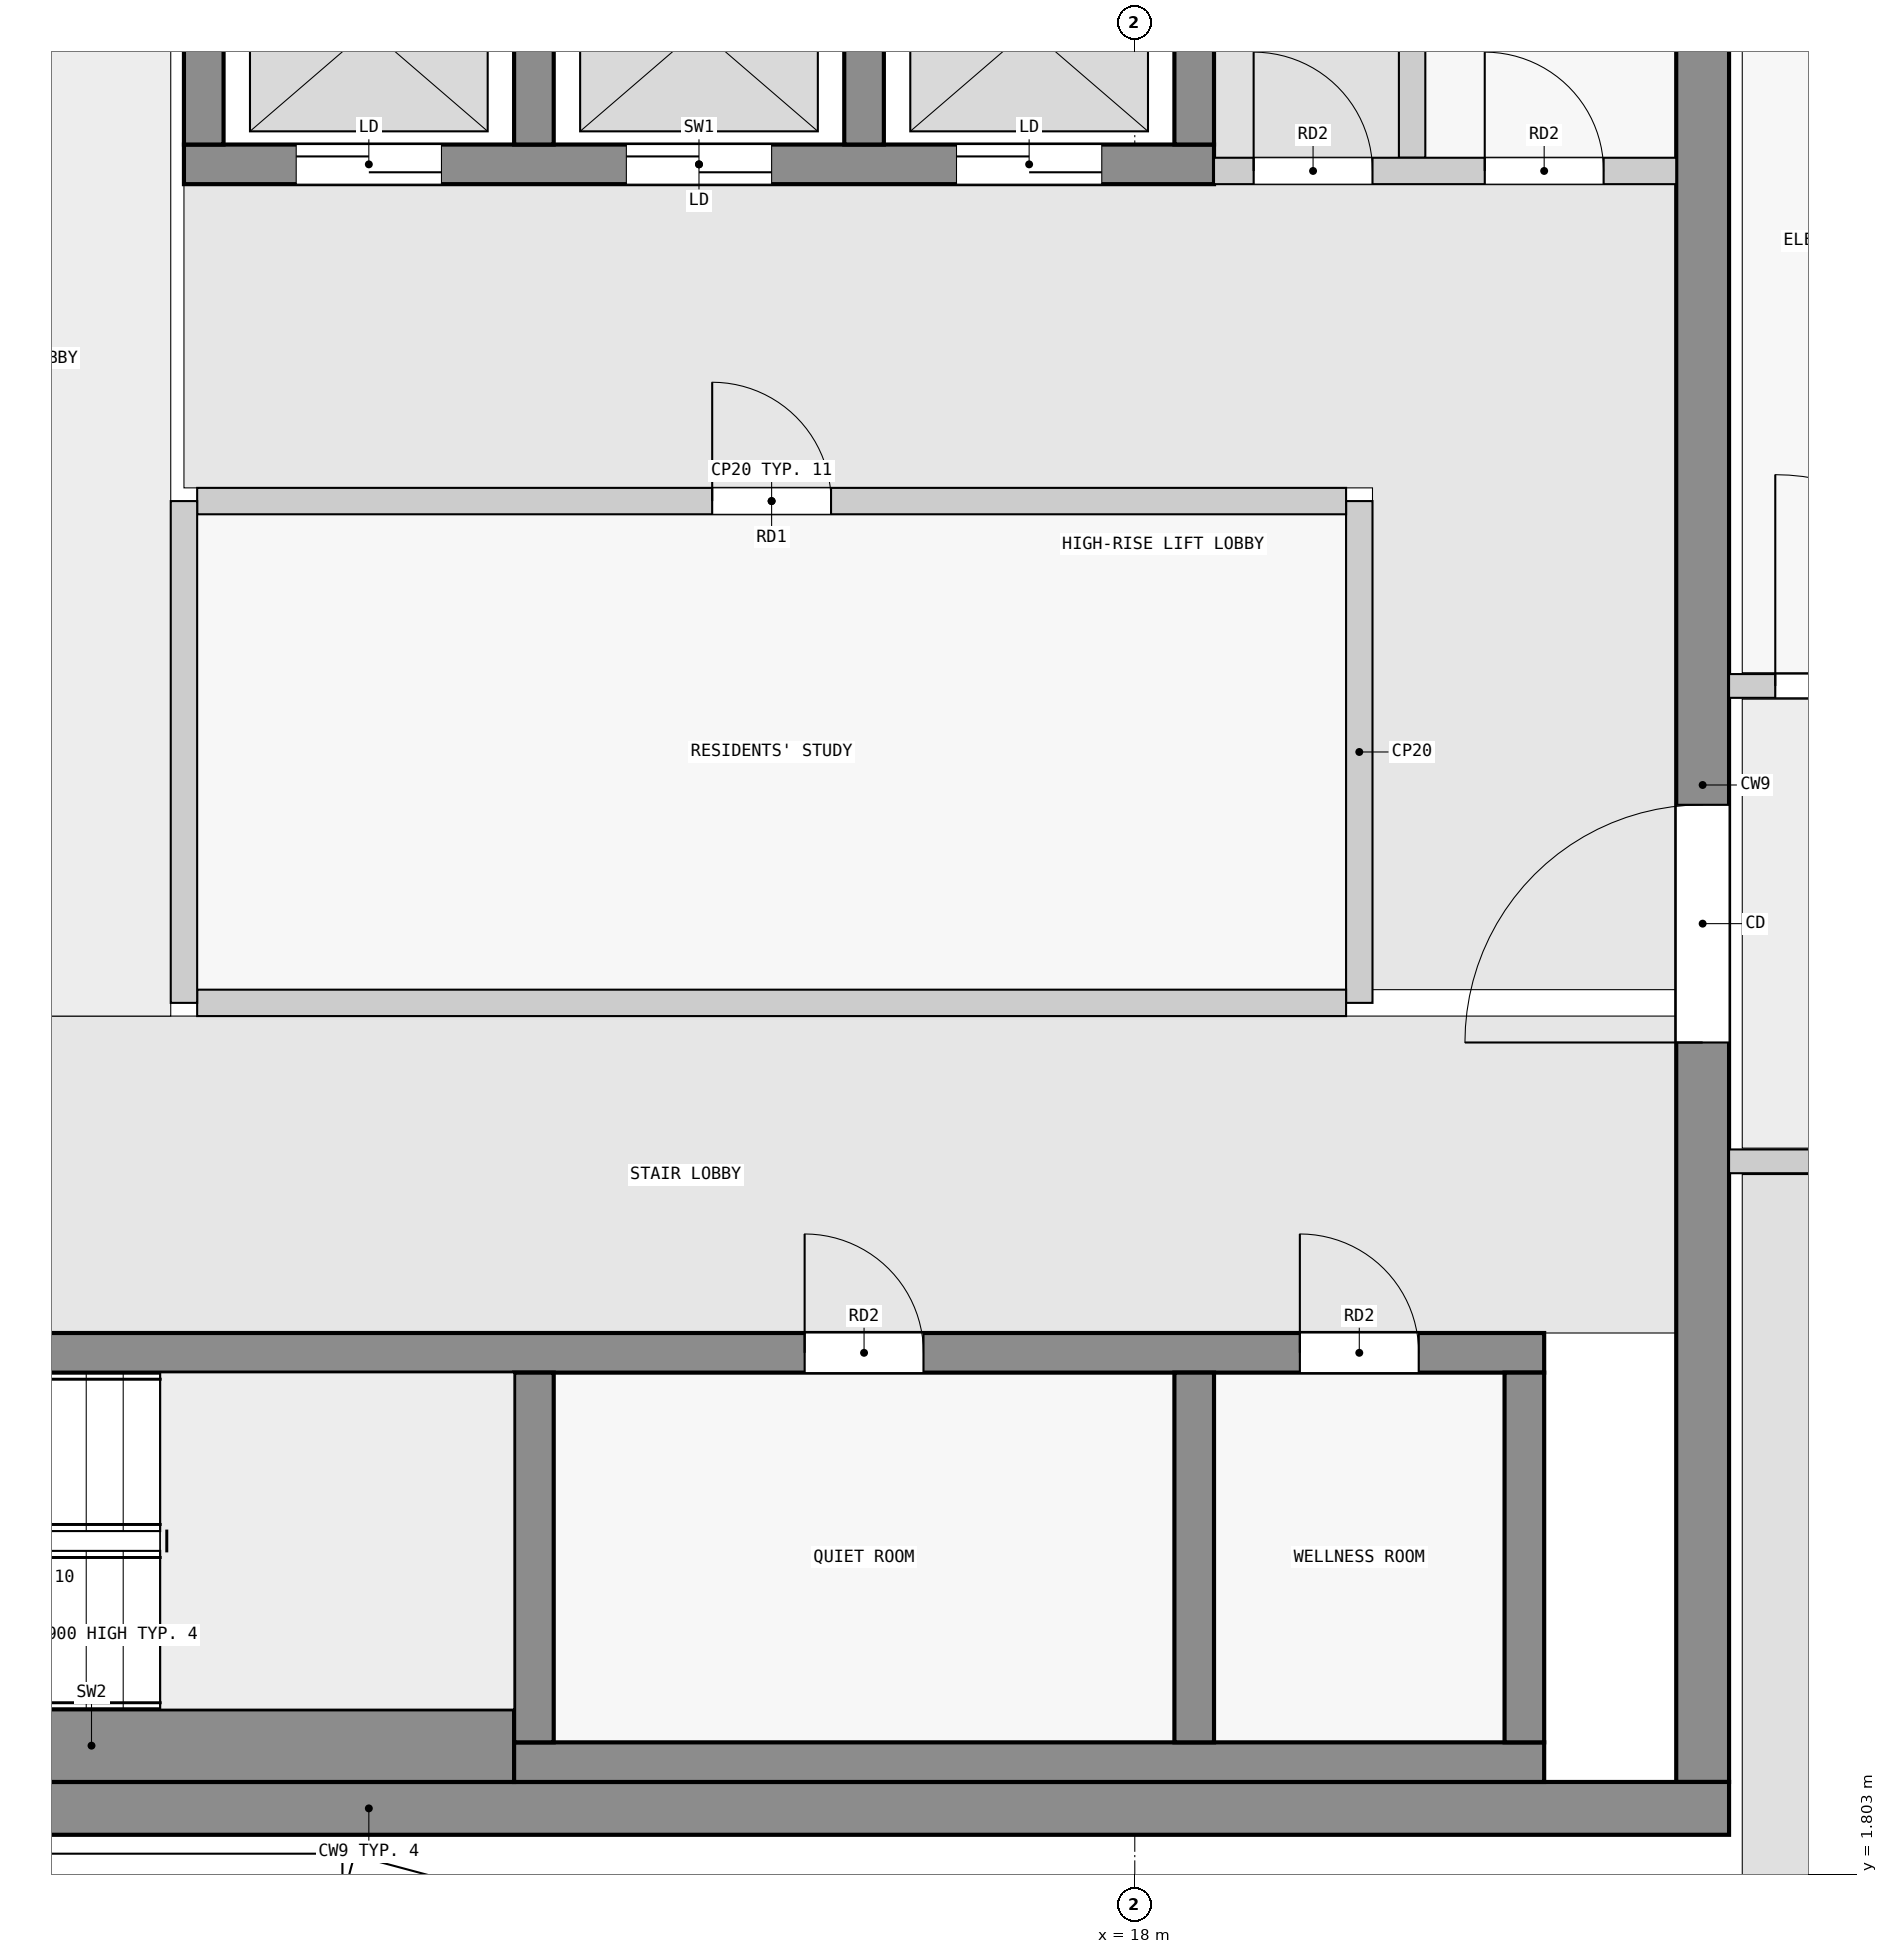
"""IFC4 building model, lengths in metres.
Left out: names, types, materials, properties, quantities, classifications, styles, units other than length and angle.
Written with IfcOpenShell. Run it as: python <this file> out.ifc"""

import sys

from ifc_helpers import new_model, si_unit, direction, frame, frame_2d, origin, place, context, subcontext, project, spatial, rectangle, extrude, element, fill, save


model = new_model("IFC4")
c1 = context("Model", 3, precision=1e-05, world=origin(), true_north=direction((0.0, 1.0)))
c2 = subcontext(c1, "Body", "Model", "MODEL_VIEW")
j1 = project(units=[si_unit("LENGTHUNIT", "METRE"), si_unit("PLANEANGLEUNIT", "RADIAN")], contexts=[c1])
p1 = place(None, origin())
s1 = spatial("IfcSite", under=j1, at=p1, CompositionType="ELEMENT")
p2 = place(p1, origin())
s2 = spatial("IfcBuilding", under=s1, at=p2, CompositionType="ELEMENT")
p3 = place(p2, frame((0.0, 0.0, 308.9)))
s3 = spatial("IfcBuildingStorey", under=s2, at=p3, CompositionType="ELEMENT", Elevation=308.9)
p4 = place(p3, frame((1.9, 2.3, 0.0), z_axis=(0.0, 0.0, 1.0), x_axis=(1.0, 0.0, 0.0)))
e1 = element("IfcWall", 1, at=p4, inside=s3, PredefinedType="SHEAR", context=c2, shape_type="SweptSolid", body=[
    extrude(rectangle(XDim=20.6, YDim=0.4, at=frame_2d((10.3, 0.0))), origin(), (0.0, 0.0, 1.0), 3.2),
])
p5 = place(p3, frame((22.3, 2.5, 0.0), z_axis=(0.0, 0.0, 1.0), x_axis=(0.0, 1.0, 0.0)))
e2 = element("IfcWall", 2, at=p5, inside=s3, PredefinedType="SHEAR", context=c2, shape_type="SweptSolid", body=[
    extrude(rectangle(XDim=15.1, YDim=0.4, at=frame_2d((7.55, 0.0))), origin(), (0.0, 0.0, 1.0), 3.2),
])
p6 = place(p5, frame((5.6, 0.0, 0.0)))
e3 = element("IfcOpeningElement", 3, at=p6, cuts=e2, PredefinedType="OPENING", context=c2, shape_type="SweptSolid", body=[
    extrude(rectangle(XDim=1.8, YDim=2.1, at=frame_2d((0.9, 1.05))), frame((0.0, 0.21, 0.0), z_axis=(0.0, -1.0, 0.0), x_axis=(1.0, 0.0, 0.0)), (0.0, 0.0, 1.0), 0.42),
])
p7 = place(p3, frame((6.9, 2.775, 0.0), z_axis=(0.0, 0.0, 1.0), x_axis=(1.0, 0.0, 0.0)))
e4 = element("IfcWall", 4, at=p7, inside=s3, PredefinedType="SHEAR", context=c2, shape_type="SweptSolid", body=[
    extrude(rectangle(XDim=6.4, YDim=0.55, at=frame_2d((3.2, 0.0))), origin(), (0.0, 0.0, 1.0), 3.2),
])
p8 = place(p3, frame((13.3, 2.65, 0.0), z_axis=(0.0, 0.0, 1.0), x_axis=(1.0, 0.0, 0.0)))
e5 = element("IfcWall", 5, at=p8, inside=s3, PredefinedType="SHEAR", context=c2, shape_type="SweptSolid", body=[
    extrude(rectangle(XDim=7.8, YDim=0.3, at=frame_2d((3.9, 0.0))), origin(), (0.0, 0.0, 1.0), 3.2),
])
for number, where, z_axis, x_axis in (
    (6, (13.45, 2.8, 0.0), (0.0, 0.0, 1.0), (0.0, 1.0, 0.0)),
    (7, (18.45, 2.8, 0.0), (0.0, 0.0, 1.0), (0.0, 1.0, 0.0)),
    (8, (20.95, 2.8, 0.0), (0.0, 0.0, 1.0), (0.0, 1.0, 0.0)),
):
    element("IfcWall", number, at=place(p3, frame(where, z_axis=z_axis, x_axis=x_axis)), inside=s3, PredefinedType="SHEAR", context=c2, shape_type="SweptSolid", body=[
        extrude(rectangle(XDim=2.8, YDim=0.3, at=frame_2d((1.4, 0.0))), origin(), (0.0, 0.0, 1.0), 3.2),
    ])
p9 = place(p3, frame((2.3, 5.75, 0.0), z_axis=(0.0, 0.0, 1.0), x_axis=(1.0, 0.0, 0.0)))
e9 = element("IfcWall", 9, at=p9, inside=s3, PredefinedType="SHEAR", context=c2, shape_type="SweptSolid", body=[
    extrude(rectangle(XDim=18.8, YDim=0.3, at=frame_2d((9.4, 0.0))), origin(), (0.0, 0.0, 1.0), 3.2),
])
p10 = place(p9, frame((4.65, 0.0, 0.0)))
e10 = element("IfcOpeningElement", 10, at=p10, cuts=e9, PredefinedType="OPENING", context=c2, shape_type="SweptSolid", body=[
    extrude(rectangle(XDim=1.1, YDim=2.1, at=frame_2d((0.55, 1.05))), frame((0.0, 0.16, 0.0), z_axis=(0.0, -1.0, 0.0), x_axis=(1.0, 0.0, 0.0)), (0.0, 0.0, 1.0), 0.32),
])
p11 = place(p9, frame((0.45, 0.0, 0.0)))
e11 = element("IfcOpeningElement", 11, at=p11, cuts=e9, PredefinedType="OPENING", context=c2, shape_type="SweptSolid", body=[
    extrude(rectangle(XDim=1.1, YDim=2.1, at=frame_2d((0.55, 1.05))), frame((0.0, 0.16, 0.0), z_axis=(0.0, -1.0, 0.0), x_axis=(1.0, 0.0, 0.0)), (0.0, 0.0, 1.0), 0.32),
])
p12 = place(p9, frame((2.75, 0.0, 0.0)))
e12 = element("IfcOpeningElement", 12, at=p12, cuts=e9, PredefinedType="OPENING", context=c2, shape_type="SweptSolid", body=[
    extrude(rectangle(XDim=1.1, YDim=2.1, at=frame_2d((0.55, 1.05))), frame((0.0, 0.16, 0.0), z_axis=(0.0, -1.0, 0.0), x_axis=(1.0, 0.0, 0.0)), (0.0, 0.0, 1.0), 0.32),
])
p13 = place(p9, frame((13.2, 0.0, 0.0)))
e13 = element("IfcOpeningElement", 13, at=p13, cuts=e9, PredefinedType="OPENING", context=c2, shape_type="SweptSolid", body=[
    extrude(rectangle(XDim=0.9, YDim=2.1, at=frame_2d((0.45, 1.05))), frame((0.0, 0.16, 0.0), z_axis=(0.0, -1.0, 0.0), x_axis=(1.0, 0.0, 0.0)), (0.0, 0.0, 1.0), 0.32),
])
p14 = place(p9, frame((16.95, 0.0, 0.0)))
e14 = element("IfcOpeningElement", 14, at=p14, cuts=e9, PredefinedType="OPENING", context=c2, shape_type="SweptSolid", body=[
    extrude(rectangle(XDim=0.9, YDim=2.1, at=frame_2d((0.45, 1.05))), frame((0.0, 0.16, 0.0), z_axis=(0.0, -1.0, 0.0), x_axis=(1.0, 0.0, 0.0)), (0.0, 0.0, 1.0), 0.32),
])
p15 = place(p3, frame((10.8, 14.75, 0.0), z_axis=(0.0, 0.0, 1.0), x_axis=(1.0, 0.0, 0.0)))
e15 = element("IfcWall", 15, at=p15, inside=s3, PredefinedType="SHEAR", context=c2, shape_type="SweptSolid", body=[
    extrude(rectangle(XDim=7.8, YDim=0.3, at=frame_2d((3.9, 0.0))), origin(), (0.0, 0.0, 1.0), 3.2),
])
p16 = place(p15, frame((0.85, 0.0, 0.0)))
e16 = element("IfcOpeningElement", 16, at=p16, cuts=e15, PredefinedType="OPENING", context=c2, shape_type="SweptSolid", body=[
    extrude(rectangle(XDim=1.1, YDim=2.1, at=frame_2d((0.55, 1.05))), frame((0.0, 0.16, 0.0), z_axis=(0.0, -1.0, 0.0), x_axis=(1.0, 0.0, 0.0)), (0.0, 0.0, 1.0), 0.32),
])
p17 = place(p15, frame((3.35, 0.0, 0.0)))
e17 = element("IfcOpeningElement", 17, at=p17, cuts=e15, PredefinedType="OPENING", context=c2, shape_type="SweptSolid", body=[
    extrude(rectangle(XDim=1.1, YDim=2.1, at=frame_2d((0.55, 1.05))), frame((0.0, 0.16, 0.0), z_axis=(0.0, -1.0, 0.0), x_axis=(1.0, 0.0, 0.0)), (0.0, 0.0, 1.0), 0.32),
])
p18 = place(p15, frame((5.85, 0.0, 0.0)))
e18 = element("IfcOpeningElement", 18, at=p18, cuts=e15, PredefinedType="OPENING", context=c2, shape_type="SweptSolid", body=[
    extrude(rectangle(XDim=1.1, YDim=2.1, at=frame_2d((0.55, 1.05))), frame((0.0, 0.16, 0.0), z_axis=(0.0, -1.0, 0.0), x_axis=(1.0, 0.0, 0.0)), (0.0, 0.0, 1.0), 0.32),
])
for number, where, z_axis, x_axis in (
    (19, (10.95, 14.9, 0.0), (0.0, 0.0, 1.0), (0.0, 1.0, 0.0)),
    (20, (13.45, 14.9, 0.0), (0.0, 0.0, 1.0), (0.0, 1.0, 0.0)),
    (21, (15.95, 14.9, 0.0), (0.0, 0.0, 1.0), (0.0, 1.0, 0.0)),
    (22, (18.45, 14.9, 0.0), (0.0, 0.0, 1.0), (0.0, 1.0, 0.0)),
):
    element("IfcWall", number, at=place(p3, frame(where, z_axis=z_axis, x_axis=x_axis)), inside=s3, PredefinedType="SHEAR", context=c2, shape_type="SweptSolid", body=[
        extrude(rectangle(XDim=2.0, YDim=0.3, at=frame_2d((1.0, 0.0))), origin(), (0.0, 0.0, 1.0), 3.2),
    ])
p19 = place(p3, frame((10.8, 8.4, 0.0), z_axis=(0.0, 0.0, 1.0), x_axis=(0.0, 1.0, 0.0)))
e23 = element("IfcWall", 23, at=p19, inside=s3, PredefinedType="PARTITIONING", context=c2, shape_type="SweptSolid", body=[
    extrude(rectangle(XDim=3.8, YDim=0.2, at=frame_2d((1.9, 0.0))), origin(), (0.0, 0.0, 1.0), 3.2),
])
p20 = place(p3, frame((10.9, 8.4, 0.0), z_axis=(0.0, 0.0, 1.0), x_axis=(1.0, 0.0, 0.0)))
e24 = element("IfcWall", 24, at=p20, inside=s3, PredefinedType="PARTITIONING", context=c2, shape_type="SweptSolid", body=[
    extrude(rectangle(XDim=8.7, YDim=0.2, at=frame_2d((4.35, 0.0))), origin(), (0.0, 0.0, 1.0), 3.2),
])
p21 = place(p3, frame((19.7, 8.4, 0.0), z_axis=(0.0, 0.0, 1.0), x_axis=(0.0, 1.0, 0.0)))
e25 = element("IfcWall", 25, at=p21, inside=s3, PredefinedType="PARTITIONING", context=c2, shape_type="SweptSolid", body=[
    extrude(rectangle(XDim=3.8, YDim=0.2, at=frame_2d((1.9, 0.0))), origin(), (0.0, 0.0, 1.0), 3.2),
])
p22 = place(p3, frame((10.9, 12.2, 0.0), z_axis=(0.0, 0.0, 1.0), x_axis=(1.0, 0.0, 0.0)))
e26 = element("IfcWall", 26, at=p22, inside=s3, PredefinedType="PARTITIONING", context=c2, shape_type="SweptSolid", body=[
    extrude(rectangle(XDim=8.7, YDim=0.2, at=frame_2d((4.35, 0.0))), origin(), (0.0, 0.0, 1.0), 3.2),
])
p23 = place(p22, frame((3.9, 0.0, 0.0)))
e27 = element("IfcOpeningElement", 27, at=p23, cuts=e26, PredefinedType="OPENING", context=c2, shape_type="SweptSolid", body=[
    extrude(rectangle(XDim=0.9, YDim=2.1, at=frame_2d((0.45, 1.05))), frame((0.0, 0.11, 0.0), z_axis=(0.0, -1.0, 0.0), x_axis=(1.0, 0.0, 0.0)), (0.0, 0.0, 1.0), 0.22),
])
p24 = place(p3, frame((18.6, 14.7, 0.0), z_axis=(0.0, 0.0, 1.0), x_axis=(1.0, 0.0, 0.0)))
e28 = element("IfcWall", 28, at=p24, inside=s3, PredefinedType="PARTITIONING", context=c2, shape_type="SweptSolid", body=[
    extrude(rectangle(XDim=3.5, YDim=0.2, at=frame_2d((1.75, 0.0))), origin(), (0.0, 0.0, 1.0), 3.2),
])
p25 = place(p24, frame((0.3, 0.0, 0.0)))
e29 = element("IfcOpeningElement", 29, at=p25, cuts=e28, PredefinedType="OPENING", context=c2, shape_type="SweptSolid", body=[
    extrude(rectangle(XDim=0.9, YDim=2.1, at=frame_2d((0.45, 1.05))), frame((0.0, 0.11, 0.0), z_axis=(0.0, -1.0, 0.0), x_axis=(1.0, 0.0, 0.0)), (0.0, 0.0, 1.0), 0.22),
])
p26 = place(p24, frame((2.05, 0.0, 0.0)))
e30 = element("IfcOpeningElement", 30, at=p26, cuts=e28, PredefinedType="OPENING", context=c2, shape_type="SweptSolid", body=[
    extrude(rectangle(XDim=0.9, YDim=2.1, at=frame_2d((0.45, 1.05))), frame((0.0, 0.11, 0.0), z_axis=(0.0, -1.0, 0.0), x_axis=(1.0, 0.0, 0.0)), (0.0, 0.0, 1.0), 0.22),
])
p27 = place(p3, frame((20.1, 14.8, 0.0), z_axis=(0.0, 0.0, 1.0), x_axis=(0.0, 1.0, 0.0)))
e31 = element("IfcWall", 31, at=p27, inside=s3, PredefinedType="PARTITIONING", context=c2, shape_type="SweptSolid", body=[
    extrude(rectangle(XDim=2.8, YDim=0.2, at=frame_2d((1.4, 0.0))), origin(), (0.0, 0.0, 1.0), 3.2),
])
p28 = place(p3, frame((27.0, 7.2, 0.0), z_axis=(0.0, 0.0, 1.0), x_axis=(-1.0, 0.0, 0.0)))
e32 = element("IfcWall", 32, at=p28, inside=s3, PredefinedType="PARTITIONING", context=c2, shape_type="SweptSolid", body=[
    extrude(rectangle(XDim=4.5, YDim=0.18, at=frame_2d((2.25, 0.0))), origin(), (0.0, 0.0, 1.0), 2.592),
])
p29 = place(p28, frame((1.35, 0.0, 0.0)))
e33 = element("IfcOpeningElement", 33, at=p29, cuts=e32, PredefinedType="OPENING", context=c2, shape_type="SweptSolid", body=[
    extrude(rectangle(XDim=1.6, YDim=2.4, at=frame_2d((0.8, 1.2))), frame((0.0, 0.1, 0.0), z_axis=(0.0, -1.0, 0.0), x_axis=(1.0, 0.0, 0.0)), (0.0, 0.0, 1.0), 0.2),
])
p30 = place(p3, frame((22.5, 10.8, 0.0), z_axis=(0.0, 0.0, 1.0), x_axis=(1.0, 0.0, 0.0)))
e34 = element("IfcWall", 34, at=p30, inside=s3, PredefinedType="PARTITIONING", context=c2, shape_type="SweptSolid", body=[
    extrude(rectangle(XDim=2.25, YDim=0.18, at=frame_2d((1.125, 0.0))), origin(), (0.0, 0.0, 1.0), 3.2),
])
p31 = place(p30, frame((0.35, 0.0, 0.0)))
e35 = element("IfcOpeningElement", 35, at=p31, cuts=e34, PredefinedType="OPENING", context=c2, shape_type="SweptSolid", body=[
    extrude(rectangle(XDim=1.6, YDim=2.4, at=frame_2d((0.8, 1.2))), frame((0.0, 0.1, 0.0), z_axis=(0.0, -1.0, 0.0), x_axis=(1.0, 0.0, 0.0)), (0.0, 0.0, 1.0), 0.2),
])
p32 = place(p23, origin())
e36 = element("IfcDoor", 36, at=p32, inside=s3, OperationType="SINGLE_SWING_LEFT", PredefinedType="DOOR", context=c2, shape_type="SweptSolid", body=[
    extrude(rectangle(XDim=0.9, YDim=2.1, at=frame_2d((0.45, 1.05))), frame((0.0, 0.025, 0.0), z_axis=(0.0, -1.0, 0.0), x_axis=(1.0, 0.0, 0.0)), (0.0, 0.0, 1.0), 0.05),
])
fill(e27, e36)
p33 = place(p16, origin())
e37 = element("IfcDoor", 37, at=p33, inside=s3, OperationType="DOUBLE_DOOR_SLIDING", PredefinedType="DOOR", context=c2, shape_type="SweptSolid", body=[
    extrude(rectangle(XDim=1.1, YDim=2.1, at=frame_2d((0.55, 1.05))), frame((0.0, 0.025, 0.0), z_axis=(0.0, -1.0, 0.0), x_axis=(1.0, 0.0, 0.0)), (0.0, 0.0, 1.0), 0.05),
])
fill(e16, e37)
p34 = place(p17, origin())
e38 = element("IfcDoor", 38, at=p34, inside=s3, OperationType="DOUBLE_DOOR_SLIDING", PredefinedType="DOOR", context=c2, shape_type="SweptSolid", body=[
    extrude(rectangle(XDim=1.1, YDim=2.1, at=frame_2d((0.55, 1.05))), frame((0.0, 0.025, 0.0), z_axis=(0.0, -1.0, 0.0), x_axis=(1.0, 0.0, 0.0)), (0.0, 0.0, 1.0), 0.05),
])
fill(e17, e38)
p35 = place(p18, origin())
e39 = element("IfcDoor", 39, at=p35, inside=s3, OperationType="DOUBLE_DOOR_SLIDING", PredefinedType="DOOR", context=c2, shape_type="SweptSolid", body=[
    extrude(rectangle(XDim=1.1, YDim=2.1, at=frame_2d((0.55, 1.05))), frame((0.0, 0.025, 0.0), z_axis=(0.0, -1.0, 0.0), x_axis=(1.0, 0.0, 0.0)), (0.0, 0.0, 1.0), 0.05),
])
fill(e18, e39)
p36 = place(p6, origin())
e40 = element("IfcDoor", 40, at=p36, inside=s3, OperationType="DOUBLE_DOOR_SINGLE_SWING", PredefinedType="DOOR", context=c2, shape_type="SweptSolid", body=[
    extrude(rectangle(XDim=1.8, YDim=2.1, at=frame_2d((0.9, 1.05))), frame((0.0, 0.025, 0.0), z_axis=(0.0, -1.0, 0.0), x_axis=(1.0, 0.0, 0.0)), (0.0, 0.0, 1.0), 0.05),
])
fill(e3, e40)
p37 = place(p25, origin())
e41 = element("IfcDoor", 41, at=p37, inside=s3, OperationType="SINGLE_SWING_LEFT", PredefinedType="DOOR", context=c2, shape_type="SweptSolid", body=[
    extrude(rectangle(XDim=0.9, YDim=2.1, at=frame_2d((0.45, 1.05))), frame((0.0, 0.025, 0.0), z_axis=(0.0, -1.0, 0.0), x_axis=(1.0, 0.0, 0.0)), (0.0, 0.0, 1.0), 0.05),
])
fill(e29, e41)
p38 = place(p26, origin())
e42 = element("IfcDoor", 42, at=p38, inside=s3, OperationType="SINGLE_SWING_LEFT", PredefinedType="DOOR", context=c2, shape_type="SweptSolid", body=[
    extrude(rectangle(XDim=0.9, YDim=2.1, at=frame_2d((0.45, 1.05))), frame((0.0, 0.025, 0.0), z_axis=(0.0, -1.0, 0.0), x_axis=(1.0, 0.0, 0.0)), (0.0, 0.0, 1.0), 0.05),
])
fill(e30, e42)
p39 = place(p13, origin())
e43 = element("IfcDoor", 43, at=p39, inside=s3, OperationType="SINGLE_SWING_LEFT", PredefinedType="DOOR", context=c2, shape_type="SweptSolid", body=[
    extrude(rectangle(XDim=0.9, YDim=2.1, at=frame_2d((0.45, 1.05))), frame((0.0, 0.025, 0.0), z_axis=(0.0, -1.0, 0.0), x_axis=(1.0, 0.0, 0.0)), (0.0, 0.0, 1.0), 0.05),
])
fill(e13, e43)
p40 = place(p14, origin())
e44 = element("IfcDoor", 44, at=p40, inside=s3, OperationType="SINGLE_SWING_LEFT", PredefinedType="DOOR", context=c2, shape_type="SweptSolid", body=[
    extrude(rectangle(XDim=0.9, YDim=2.1, at=frame_2d((0.45, 1.05))), frame((0.0, 0.025, 0.0), z_axis=(0.0, -1.0, 0.0), x_axis=(1.0, 0.0, 0.0)), (0.0, 0.0, 1.0), 0.05),
])
fill(e14, e44)
p41 = place(p31, origin())
e45 = element("IfcDoor", 45, at=p41, inside=s3, OperationType="SINGLE_SWING_LEFT", PredefinedType="DOOR", context=c2, shape_type="SweptSolid", body=[
    extrude(rectangle(XDim=1.6, YDim=2.4, at=frame_2d((0.8, 1.2))), frame((0.0, 0.025, 0.0), z_axis=(0.0, -1.0, 0.0), x_axis=(1.0, 0.0, 0.0)), (0.0, 0.0, 1.0), 0.05),
])
fill(e35, e45)
save(model, sys.argv[1])
